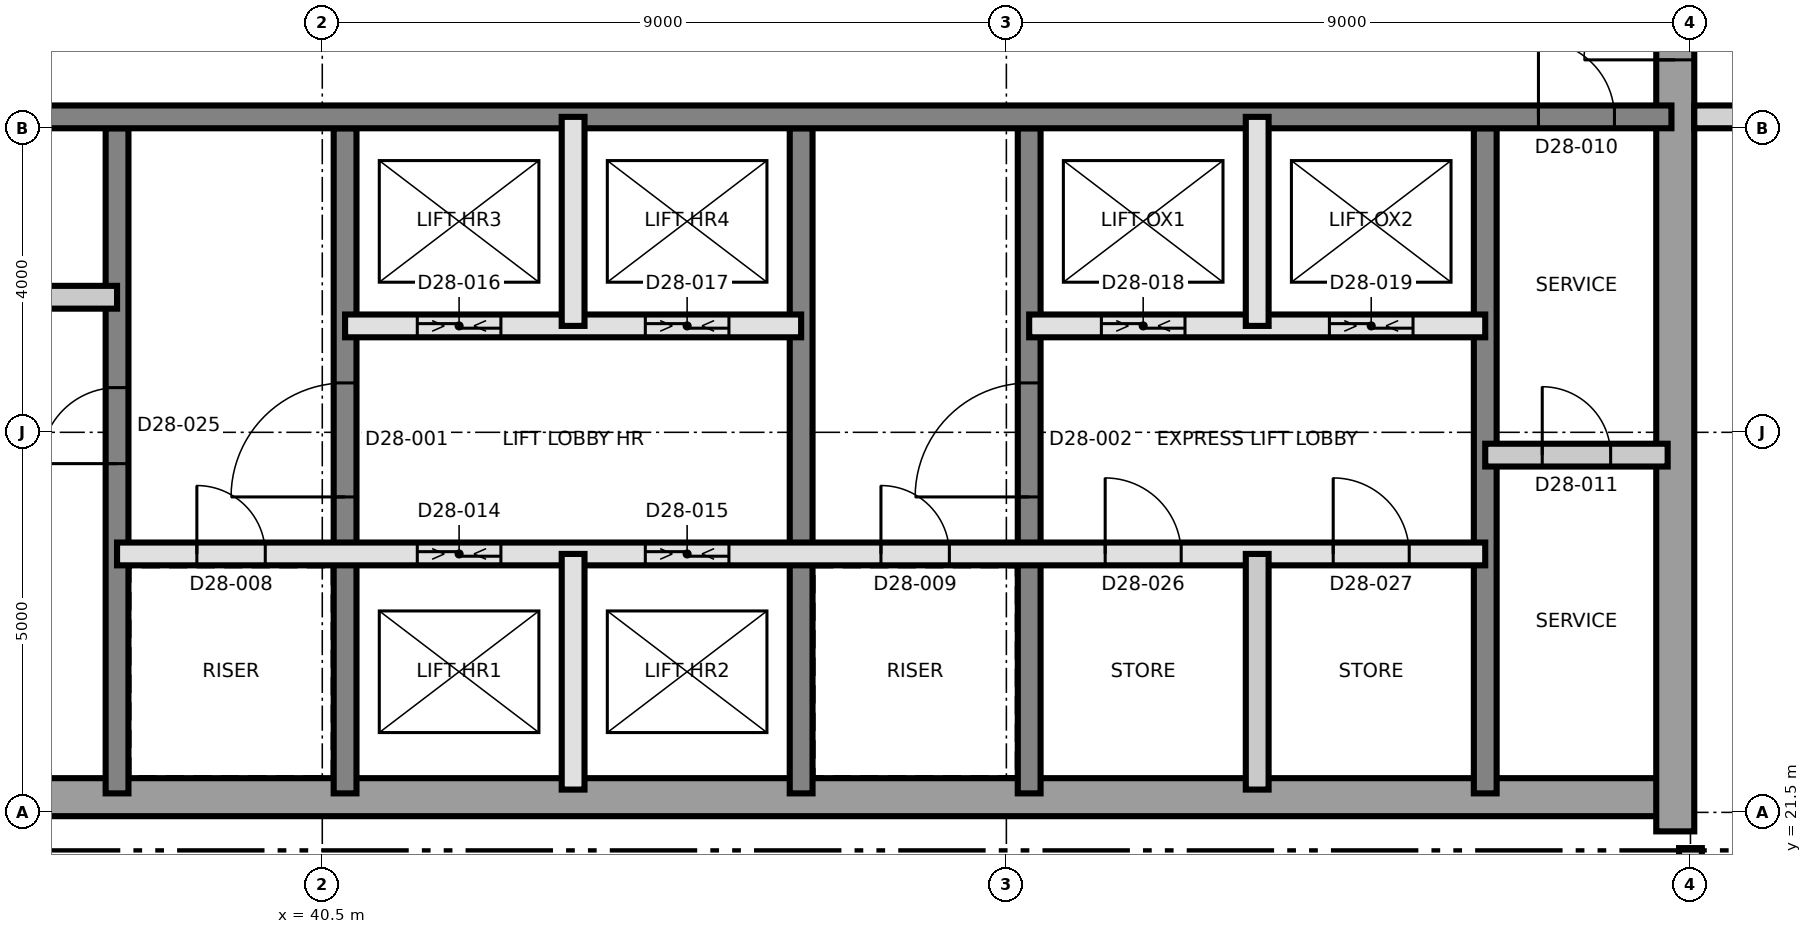
"""IFC4 building model, lengths in metres.
Left out: names, types, materials, properties, quantities, classifications, styles, units other than length and angle.
Written with IfcOpenShell. Run it as: python <this file> out.ifc"""

import sys

from ifc_helpers import new_model, si_unit, direction, frame, frame_2d, origin, place, context, subcontext, project, spatial, rectangle, extrude, element, fill, save


model = new_model("IFC4")
c1 = context("Model", 3, precision=1e-05, world=origin(), true_north=direction((0.0, 1.0)))
c2 = subcontext(c1, "Body", "Model", "MODEL_VIEW")
j1 = project(units=[si_unit("LENGTHUNIT", "METRE"), si_unit("PLANEANGLEUNIT", "RADIAN")], contexts=[c1])
p1 = place(None, origin())
s1 = spatial("IfcSite", under=j1, at=p1, CompositionType="ELEMENT")
p2 = place(p1, origin())
s2 = spatial("IfcBuilding", under=s1, at=p2, CompositionType="ELEMENT")
p3 = place(p2, frame((0.0, 0.0, 249.4)))
s3 = spatial("IfcBuildingStorey", under=s2, at=p3, CompositionType="ELEMENT", Elevation=249.4)
p4 = place(p3, frame((31.25, 21.7, 0.0), z_axis=(0.0, 0.0, 1.0), x_axis=(1.0, 0.0, 0.0)))
e1 = element("IfcWall", 1, at=p4, inside=s3, PredefinedType="SHEAR", context=c2, shape_type="SweptSolid", body=[
    extrude(rectangle(XDim=27.0, YDim=0.5, at=frame_2d((13.5, 0.0))), origin(), (0.0, 0.0, 1.0), 5.5),
])
p5 = place(p3, frame((58.3, 21.25, 0.0), z_axis=(0.0, 0.0, 1.0), x_axis=(0.0, 1.0, 0.0)))
e2 = element("IfcWall", 2, at=p5, inside=s3, PredefinedType="SHEAR", context=c2, shape_type="SweptSolid", body=[
    extrude(rectangle(XDim=18.5, YDim=0.5, at=frame_2d((9.25, 0.0))), origin(), (0.0, 0.0, 1.0), 5.5),
])
p6 = place(p5, frame((10.15, 0.0, 0.0)))
e3 = element("IfcOpeningElement", 3, at=p6, cuts=e2, PredefinedType="OPENING", context=c2, shape_type="SweptSolid", body=[
    extrude(rectangle(XDim=1.2, YDim=2.1, at=frame_2d((0.6, 1.05))), frame((0.0, 0.26, 0.0), z_axis=(0.0, -1.0, 0.0), x_axis=(1.0, 0.0, 0.0)), (0.0, 0.0, 1.0), 0.52),
])
p7 = place(p3, frame((37.8, 21.75, 0.0), z_axis=(0.0, 0.0, 1.0), x_axis=(0.0, 1.0, 0.0)))
e4 = element("IfcWall", 4, at=p7, inside=s3, PredefinedType="SHEAR", context=c2, shape_type="SweptSolid", body=[
    extrude(rectangle(XDim=8.75, YDim=0.3, at=frame_2d((4.375, 0.0))), origin(), (0.0, 0.0, 1.0), 5.5),
])
p8 = place(p7, frame((4.338, 0.0, 0.0)))
e5 = element("IfcOpeningElement", 5, at=p8, cuts=e4, PredefinedType="OPENING", context=c2, shape_type="SweptSolid", body=[
    extrude(rectangle(XDim=1.0, YDim=2.1, at=frame_2d((0.5, 1.05))), frame((0.0, 0.16, 0.0), z_axis=(0.0, -1.0, 0.0), x_axis=(1.0, 0.0, 0.0)), (0.0, 0.0, 1.0), 0.32),
])
p9 = place(p3, frame((40.8, 21.75, 0.0), z_axis=(0.0, 0.0, 1.0), x_axis=(0.0, 1.0, 0.0)))
e6 = element("IfcWall", 6, at=p9, inside=s3, PredefinedType="SHEAR", context=c2, shape_type="SweptSolid", body=[
    extrude(rectangle(XDim=8.75, YDim=0.3, at=frame_2d((4.375, 0.0))), origin(), (0.0, 0.0, 1.0), 5.5),
])
p10 = place(p9, frame((3.9, 0.0, 0.0)))
e7 = element("IfcOpeningElement", 7, at=p10, cuts=e6, PredefinedType="OPENING", context=c2, shape_type="SweptSolid", body=[
    extrude(rectangle(XDim=1.5, YDim=2.1, at=frame_2d((0.75, 1.05))), frame((0.0, 0.16, 0.0), z_axis=(0.0, -1.0, 0.0), x_axis=(1.0, 0.0, 0.0)), (0.0, 0.0, 1.0), 0.32),
])
p11 = place(p3, frame((46.8, 21.75, 0.0), z_axis=(0.0, 0.0, 1.0), x_axis=(0.0, 1.0, 0.0)))
e8 = element("IfcWall", 8, at=p11, inside=s3, PredefinedType="SHEAR", context=c2, shape_type="SweptSolid", body=[
    extrude(rectangle(XDim=8.75, YDim=0.3, at=frame_2d((4.375, 0.0))), origin(), (0.0, 0.0, 1.0), 5.5),
])
p12 = place(p3, frame((49.8, 21.75, 0.0), z_axis=(0.0, 0.0, 1.0), x_axis=(0.0, 1.0, 0.0)))
e9 = element("IfcWall", 9, at=p12, inside=s3, PredefinedType="SHEAR", context=c2, shape_type="SweptSolid", body=[
    extrude(rectangle(XDim=8.75, YDim=0.3, at=frame_2d((4.375, 0.0))), origin(), (0.0, 0.0, 1.0), 5.5),
])
p13 = place(p12, frame((3.9, 0.0, 0.0)))
e10 = element("IfcOpeningElement", 10, at=p13, cuts=e9, PredefinedType="OPENING", context=c2, shape_type="SweptSolid", body=[
    extrude(rectangle(XDim=1.5, YDim=2.1, at=frame_2d((0.75, 1.05))), frame((0.0, 0.16, 0.0), z_axis=(0.0, -1.0, 0.0), x_axis=(1.0, 0.0, 0.0)), (0.0, 0.0, 1.0), 0.32),
])
p14 = place(p3, frame((55.8, 21.75, 0.0), z_axis=(0.0, 0.0, 1.0), x_axis=(0.0, 1.0, 0.0)))
e11 = element("IfcWall", 11, at=p14, inside=s3, PredefinedType="SHEAR", context=c2, shape_type="SweptSolid", body=[
    extrude(rectangle(XDim=8.75, YDim=0.3, at=frame_2d((4.375, 0.0))), origin(), (0.0, 0.0, 1.0), 5.5),
])
p15 = place(p3, frame((31.75, 30.65, 0.0), z_axis=(0.0, 0.0, 1.0), x_axis=(1.0, 0.0, 0.0)))
e12 = element("IfcWall", 12, at=p15, inside=s3, PredefinedType="SHEAR", context=c2, shape_type="SweptSolid", body=[
    extrude(rectangle(XDim=26.5, YDim=0.3, at=frame_2d((13.25, 0.0))), origin(), (0.0, 0.0, 1.0), 5.5),
])
p16 = place(p15, frame((24.75, 0.0, 0.0)))
e13 = element("IfcOpeningElement", 13, at=p16, cuts=e12, PredefinedType="OPENING", context=c2, shape_type="SweptSolid", body=[
    extrude(rectangle(XDim=1.0, YDim=2.1, at=frame_2d((0.5, 1.05))), frame((0.0, 0.16, 0.0), z_axis=(0.0, -1.0, 0.0), x_axis=(1.0, 0.0, 0.0)), (0.0, 0.0, 1.0), 0.32),
])
p17 = place(p15, frame((4.05, 0.0, 0.0)))
e14 = element("IfcOpeningElement", 14, at=p17, cuts=e12, PredefinedType="OPENING", context=c2, shape_type="SweptSolid", body=[
    extrude(rectangle(XDim=1.0, YDim=2.1, at=frame_2d((0.5, 1.05))), frame((0.0, 0.16, 0.0), z_axis=(0.0, -1.0, 0.0), x_axis=(1.0, 0.0, 0.0)), (0.0, 0.0, 1.0), 0.32),
])
p18 = place(p3, frame((37.8, 24.9, 0.0), z_axis=(0.0, 0.0, 1.0), x_axis=(1.0, 0.0, 0.0)))
e15 = element("IfcWall", 15, at=p18, inside=s3, PredefinedType="SOLIDWALL", context=c2, shape_type="SweptSolid", body=[
    extrude(rectangle(XDim=18.0, YDim=0.3, at=frame_2d((9.0, 0.0))), origin(), (0.0, 0.0, 1.0), 5.2),
])
p19 = place(p18, frame((1.05, 0.0, 0.0)))
e16 = element("IfcOpeningElement", 16, at=p19, cuts=e15, PredefinedType="OPENING", context=c2, shape_type="SweptSolid", body=[
    extrude(rectangle(XDim=0.9, YDim=2.1, at=frame_2d((0.45, 1.05))), frame((0.0, 0.16, 0.0), z_axis=(0.0, -1.0, 0.0), x_axis=(1.0, 0.0, 0.0)), (0.0, 0.0, 1.0), 0.32),
])
p20 = place(p18, frame((10.05, 0.0, 0.0)))
e17 = element("IfcOpeningElement", 17, at=p20, cuts=e15, PredefinedType="OPENING", context=c2, shape_type="SweptSolid", body=[
    extrude(rectangle(XDim=0.9, YDim=2.1, at=frame_2d((0.45, 1.05))), frame((0.0, 0.16, 0.0), z_axis=(0.0, -1.0, 0.0), x_axis=(1.0, 0.0, 0.0)), (0.0, 0.0, 1.0), 0.32),
])
p21 = place(p18, frame((3.95, 0.0, 0.0)))
e18 = element("IfcOpeningElement", 18, at=p21, cuts=e15, PredefinedType="OPENING", context=c2, shape_type="SweptSolid", body=[
    extrude(rectangle(XDim=1.1, YDim=2.4, at=frame_2d((0.55, 1.2))), frame((0.0, 0.16, 0.0), z_axis=(0.0, -1.0, 0.0), x_axis=(1.0, 0.0, 0.0)), (0.0, 0.0, 1.0), 0.32),
])
p22 = place(p18, frame((6.95, 0.0, 0.0)))
e19 = element("IfcOpeningElement", 19, at=p22, cuts=e15, PredefinedType="OPENING", context=c2, shape_type="SweptSolid", body=[
    extrude(rectangle(XDim=1.1, YDim=2.4, at=frame_2d((0.55, 1.2))), frame((0.0, 0.16, 0.0), z_axis=(0.0, -1.0, 0.0), x_axis=(1.0, 0.0, 0.0)), (0.0, 0.0, 1.0), 0.32),
])
p23 = place(p18, frame((13.0, 0.0, 0.0)))
e20 = element("IfcOpeningElement", 20, at=p23, cuts=e15, PredefinedType="OPENING", context=c2, shape_type="SweptSolid", body=[
    extrude(rectangle(XDim=1.0, YDim=2.1, at=frame_2d((0.5, 1.05))), frame((0.0, 0.16, 0.0), z_axis=(0.0, -1.0, 0.0), x_axis=(1.0, 0.0, 0.0)), (0.0, 0.0, 1.0), 0.32),
])
p24 = place(p18, frame((16.0, 0.0, 0.0)))
e21 = element("IfcOpeningElement", 21, at=p24, cuts=e15, PredefinedType="OPENING", context=c2, shape_type="SweptSolid", body=[
    extrude(rectangle(XDim=1.0, YDim=2.1, at=frame_2d((0.5, 1.05))), frame((0.0, 0.16, 0.0), z_axis=(0.0, -1.0, 0.0), x_axis=(1.0, 0.0, 0.0)), (0.0, 0.0, 1.0), 0.32),
])
p25 = place(p3, frame((55.8, 26.2, 0.0), z_axis=(0.0, 0.0, 1.0), x_axis=(1.0, 0.0, 0.0)))
e22 = element("IfcWall", 22, at=p25, inside=s3, PredefinedType="PARTITIONING", context=c2, shape_type="SweptSolid", body=[
    extrude(rectangle(XDim=2.4, YDim=0.3, at=frame_2d((1.2, 0.0))), origin(), (0.0, 0.0, 1.0), 5.2),
])
p26 = place(p25, frame((0.75, 0.0, 0.0)))
e23 = element("IfcOpeningElement", 23, at=p26, cuts=e22, PredefinedType="OPENING", context=c2, shape_type="SweptSolid", body=[
    extrude(rectangle(XDim=0.9, YDim=2.1, at=frame_2d((0.45, 1.05))), frame((0.0, 0.16, 0.0), z_axis=(0.0, -1.0, 0.0), x_axis=(1.0, 0.0, 0.0)), (0.0, 0.0, 1.0), 0.32),
])
p27 = place(p3, frame((40.8, 27.9, 0.0), z_axis=(0.0, 0.0, 1.0), x_axis=(1.0, 0.0, 0.0)))
e24 = element("IfcWall", 24, at=p27, inside=s3, PredefinedType="SOLIDWALL", context=c2, shape_type="SweptSolid", body=[
    extrude(rectangle(XDim=6.0, YDim=0.3, at=frame_2d((3.0, 0.0))), origin(), (0.0, 0.0, 1.0), 5.2),
])
p28 = place(p27, frame((0.95, 0.0, 0.0)))
e25 = element("IfcOpeningElement", 25, at=p28, cuts=e24, PredefinedType="OPENING", context=c2, shape_type="SweptSolid", body=[
    extrude(rectangle(XDim=1.1, YDim=2.4, at=frame_2d((0.55, 1.2))), frame((0.0, 0.16, 0.0), z_axis=(0.0, -1.0, 0.0), x_axis=(1.0, 0.0, 0.0)), (0.0, 0.0, 1.0), 0.32),
])
p29 = place(p27, frame((3.95, 0.0, 0.0)))
e26 = element("IfcOpeningElement", 26, at=p29, cuts=e24, PredefinedType="OPENING", context=c2, shape_type="SweptSolid", body=[
    extrude(rectangle(XDim=1.1, YDim=2.4, at=frame_2d((0.55, 1.2))), frame((0.0, 0.16, 0.0), z_axis=(0.0, -1.0, 0.0), x_axis=(1.0, 0.0, 0.0)), (0.0, 0.0, 1.0), 0.32),
])
p30 = place(p3, frame((49.8, 27.9, 0.0), z_axis=(0.0, 0.0, 1.0), x_axis=(1.0, 0.0, 0.0)))
e27 = element("IfcWall", 27, at=p30, inside=s3, PredefinedType="SOLIDWALL", context=c2, shape_type="SweptSolid", body=[
    extrude(rectangle(XDim=6.0, YDim=0.3, at=frame_2d((3.0, 0.0))), origin(), (0.0, 0.0, 1.0), 5.2),
])
p31 = place(p30, frame((0.95, 0.0, 0.0)))
e28 = element("IfcOpeningElement", 28, at=p31, cuts=e27, PredefinedType="OPENING", context=c2, shape_type="SweptSolid", body=[
    extrude(rectangle(XDim=1.1, YDim=2.4, at=frame_2d((0.55, 1.2))), frame((0.0, 0.16, 0.0), z_axis=(0.0, -1.0, 0.0), x_axis=(1.0, 0.0, 0.0)), (0.0, 0.0, 1.0), 0.32),
])
p32 = place(p30, frame((3.95, 0.0, 0.0)))
e29 = element("IfcOpeningElement", 29, at=p32, cuts=e27, PredefinedType="OPENING", context=c2, shape_type="SweptSolid", body=[
    extrude(rectangle(XDim=1.1, YDim=2.4, at=frame_2d((0.55, 1.2))), frame((0.0, 0.16, 0.0), z_axis=(0.0, -1.0, 0.0), x_axis=(1.0, 0.0, 0.0)), (0.0, 0.0, 1.0), 0.32),
])
p33 = place(p3, frame((31.8, 28.277, 0.0), z_axis=(0.0, 0.0, 1.0), x_axis=(1.0, 0.0, 0.0)))
e30 = element("IfcWall", 30, at=p33, inside=s3, PredefinedType="PARTITIONING", context=c2, shape_type="SweptSolid", body=[
    extrude(rectangle(XDim=6.0, YDim=0.3, at=frame_2d((3.0, 0.0))), origin(), (0.0, 0.0, 1.0), 5.2),
])
p34 = place(p3, frame((43.8, 21.8, 0.0), z_axis=(0.0, 0.0, 1.0), x_axis=(0.0, 1.0, 0.0)))
e31 = element("IfcWall", 31, at=p34, inside=s3, PredefinedType="SOLIDWALL", context=c2, shape_type="SweptSolid", body=[
    extrude(rectangle(XDim=3.1, YDim=0.3, at=frame_2d((1.55, 0.0))), origin(), (0.0, 0.0, 1.0), 5.2),
])
p35 = place(p3, frame((43.8, 27.9, 0.0), z_axis=(0.0, 0.0, 1.0), x_axis=(0.0, 1.0, 0.0)))
e32 = element("IfcWall", 32, at=p35, inside=s3, PredefinedType="SOLIDWALL", context=c2, shape_type="SweptSolid", body=[
    extrude(rectangle(XDim=2.75, YDim=0.3, at=frame_2d((1.375, 0.0))), origin(), (0.0, 0.0, 1.0), 5.2),
])
p36 = place(p3, frame((52.8, 21.8, 0.0), z_axis=(0.0, 0.0, 1.0), x_axis=(0.0, 1.0, 0.0)))
e33 = element("IfcWall", 33, at=p36, inside=s3, PredefinedType="PARTITIONING", context=c2, shape_type="SweptSolid", body=[
    extrude(rectangle(XDim=3.1, YDim=0.3, at=frame_2d((1.55, 0.0))), origin(), (0.0, 0.0, 1.0), 5.2),
])
p37 = place(p3, frame((52.8, 27.9, 0.0), z_axis=(0.0, 0.0, 1.0), x_axis=(0.0, 1.0, 0.0)))
e34 = element("IfcWall", 34, at=p37, inside=s3, PredefinedType="SOLIDWALL", context=c2, shape_type="SweptSolid", body=[
    extrude(rectangle(XDim=2.75, YDim=0.3, at=frame_2d((1.375, 0.0))), origin(), (0.0, 0.0, 1.0), 5.2),
])
p38 = place(p3, frame((58.55, 30.65, 0.0), z_axis=(0.0, 0.0, 1.0), x_axis=(1.0, 0.0, 0.0)))
e35 = element("IfcWall", 35, at=p38, inside=s3, PredefinedType="PARTITIONING", context=c2, shape_type="SweptSolid", body=[
    extrude(rectangle(XDim=26.78, YDim=0.3, at=frame_2d((13.39, 0.0))), origin(), (0.0, 0.0, 1.0), 5.2),
])
p39 = place(p38, frame((3.75, 0.0, 0.0)))
e36 = element("IfcOpeningElement", 36, at=p39, cuts=e35, PredefinedType="OPENING", context=c2, shape_type="SweptSolid", body=[
    extrude(rectangle(XDim=1.4, YDim=2.1, at=frame_2d((0.7, 1.05))), frame((0.0, 0.16, 0.0), z_axis=(0.0, -1.0, 0.0), x_axis=(1.0, 0.0, 0.0)), (0.0, 0.0, 1.0), 0.32),
])
p40 = place(p38, frame((12.75, 0.0, 0.0)))
e37 = element("IfcOpeningElement", 37, at=p40, cuts=e35, PredefinedType="OPENING", context=c2, shape_type="SweptSolid", body=[
    extrude(rectangle(XDim=1.4, YDim=2.1, at=frame_2d((0.7, 1.05))), frame((0.0, 0.16, 0.0), z_axis=(0.0, -1.0, 0.0), x_axis=(1.0, 0.0, 0.0)), (0.0, 0.0, 1.0), 0.32),
])
p41 = place(p38, frame((21.85, 0.0, 0.0)))
e38 = element("IfcOpeningElement", 38, at=p41, cuts=e35, PredefinedType="OPENING", context=c2, shape_type="SweptSolid", body=[
    extrude(rectangle(XDim=1.2, YDim=2.1, at=frame_2d((0.6, 1.05))), frame((0.0, 0.16, 0.0), z_axis=(0.0, -1.0, 0.0), x_axis=(1.0, 0.0, 0.0)), (0.0, 0.0, 1.0), 0.32),
])
p42 = place(p3, frame((58.5, 19.77, 0.0), z_axis=(0.0, 0.0, 1.0), x_axis=(0.0, 1.0, 0.0)))
e39 = element("IfcWall", 39, at=p42, inside=s3, PredefinedType="PARTITIONING", context=c2, shape_type="SweptSolid", body=[
    extrude(rectangle(XDim=1.26, YDim=0.3, at=frame_2d((0.63, 0.0))), origin(), (0.0, 0.0, 1.0), 5.2),
])
p43 = place(p10, origin())
e40 = element("IfcDoor", 40, at=p43, inside=s3, OperationType="SINGLE_SWING_RIGHT", PredefinedType="DOOR", context=c2, shape_type="SweptSolid", body=[
    extrude(rectangle(XDim=1.5, YDim=2.1, at=frame_2d((0.75, 1.05))), frame((0.0, 0.025, 0.0), z_axis=(0.0, -1.0, 0.0), x_axis=(1.0, 0.0, 0.0)), (0.0, 0.0, 1.0), 0.05),
])
fill(e7, e40)
p44 = place(p13, origin())
e41 = element("IfcDoor", 41, at=p44, inside=s3, OperationType="SINGLE_SWING_LEFT", PredefinedType="DOOR", context=c2, shape_type="SweptSolid", body=[
    extrude(rectangle(XDim=1.5, YDim=2.1, at=frame_2d((0.75, 1.05))), frame((0.0, 0.025, 0.0), z_axis=(0.0, -1.0, 0.0), x_axis=(1.0, 0.0, 0.0)), (0.0, 0.0, 1.0), 0.05),
])
fill(e10, e41)
p45 = place(p19, origin())
e42 = element("IfcDoor", 42, at=p45, inside=s3, OperationType="SINGLE_SWING_LEFT", PredefinedType="DOOR", context=c2, shape_type="SweptSolid", body=[
    extrude(rectangle(XDim=0.9, YDim=2.1, at=frame_2d((0.45, 1.05))), frame((0.0, 0.025, 0.0), z_axis=(0.0, -1.0, 0.0), x_axis=(1.0, 0.0, 0.0)), (0.0, 0.0, 1.0), 0.05),
])
fill(e16, e42)
p46 = place(p20, origin())
e43 = element("IfcDoor", 43, at=p46, inside=s3, OperationType="SINGLE_SWING_RIGHT", PredefinedType="DOOR", context=c2, shape_type="SweptSolid", body=[
    extrude(rectangle(XDim=0.9, YDim=2.1, at=frame_2d((0.45, 1.05))), frame((0.0, 0.025, 0.0), z_axis=(0.0, -1.0, 0.0), x_axis=(1.0, 0.0, 0.0)), (0.0, 0.0, 1.0), 0.05),
])
fill(e17, e43)
p47 = place(p16, origin())
e44 = element("IfcDoor", 44, at=p47, inside=s3, OperationType="SINGLE_SWING_LEFT", PredefinedType="DOOR", context=c2, shape_type="SweptSolid", body=[
    extrude(rectangle(XDim=1.0, YDim=2.1, at=frame_2d((0.5, 1.05))), frame((0.0, 0.025, 0.0), z_axis=(0.0, -1.0, 0.0), x_axis=(1.0, 0.0, 0.0)), (0.0, 0.0, 1.0), 0.05),
])
fill(e13, e44)
p48 = place(p26, origin())
e45 = element("IfcDoor", 45, at=p48, inside=s3, OperationType="SINGLE_SWING_RIGHT", PredefinedType="DOOR", context=c2, shape_type="SweptSolid", body=[
    extrude(rectangle(XDim=0.9, YDim=2.1, at=frame_2d((0.45, 1.05))), frame((0.0, 0.025, 0.0), z_axis=(0.0, -1.0, 0.0), x_axis=(1.0, 0.0, 0.0)), (0.0, 0.0, 1.0), 0.05),
])
fill(e23, e45)
p49 = place(p6, origin())
e46 = element("IfcDoor", 46, at=p49, inside=s3, OperationType="SINGLE_SWING_LEFT", PredefinedType="DOOR", context=c2, shape_type="SweptSolid", body=[
    extrude(rectangle(XDim=1.2, YDim=2.1, at=frame_2d((0.6, 1.05))), frame((0.0, 0.025, 0.0), z_axis=(0.0, -1.0, 0.0), x_axis=(1.0, 0.0, 0.0)), (0.0, 0.0, 1.0), 0.05),
])
fill(e3, e46)
p50 = place(p21, origin())
e47 = element("IfcDoor", 47, at=p50, inside=s3, OperationType="SLIDING_TO_LEFT", PredefinedType="DOOR", context=c2, shape_type="SweptSolid", body=[
    extrude(rectangle(XDim=1.1, YDim=2.4, at=frame_2d((0.55, 1.2))), frame((0.0, 0.025, 0.0), z_axis=(0.0, -1.0, 0.0), x_axis=(1.0, 0.0, 0.0)), (0.0, 0.0, 1.0), 0.05),
])
fill(e18, e47)
p51 = place(p22, origin())
e48 = element("IfcDoor", 48, at=p51, inside=s3, OperationType="SLIDING_TO_LEFT", PredefinedType="DOOR", context=c2, shape_type="SweptSolid", body=[
    extrude(rectangle(XDim=1.1, YDim=2.4, at=frame_2d((0.55, 1.2))), frame((0.0, 0.025, 0.0), z_axis=(0.0, -1.0, 0.0), x_axis=(1.0, 0.0, 0.0)), (0.0, 0.0, 1.0), 0.05),
])
fill(e19, e48)
p52 = place(p28, origin())
e49 = element("IfcDoor", 49, at=p52, inside=s3, OperationType="SLIDING_TO_LEFT", PredefinedType="DOOR", context=c2, shape_type="SweptSolid", body=[
    extrude(rectangle(XDim=1.1, YDim=2.4, at=frame_2d((0.55, 1.2))), frame((0.0, 0.025, 0.0), z_axis=(0.0, -1.0, 0.0), x_axis=(1.0, 0.0, 0.0)), (0.0, 0.0, 1.0), 0.05),
])
fill(e25, e49)
p53 = place(p29, origin())
e50 = element("IfcDoor", 50, at=p53, inside=s3, OperationType="SLIDING_TO_LEFT", PredefinedType="DOOR", context=c2, shape_type="SweptSolid", body=[
    extrude(rectangle(XDim=1.1, YDim=2.4, at=frame_2d((0.55, 1.2))), frame((0.0, 0.025, 0.0), z_axis=(0.0, -1.0, 0.0), x_axis=(1.0, 0.0, 0.0)), (0.0, 0.0, 1.0), 0.05),
])
fill(e26, e50)
p54 = place(p31, origin())
e51 = element("IfcDoor", 51, at=p54, inside=s3, OperationType="SLIDING_TO_LEFT", PredefinedType="DOOR", context=c2, shape_type="SweptSolid", body=[
    extrude(rectangle(XDim=1.1, YDim=2.4, at=frame_2d((0.55, 1.2))), frame((0.0, 0.025, 0.0), z_axis=(0.0, -1.0, 0.0), x_axis=(1.0, 0.0, 0.0)), (0.0, 0.0, 1.0), 0.05),
])
fill(e28, e51)
p55 = place(p32, origin())
e52 = element("IfcDoor", 52, at=p55, inside=s3, OperationType="SLIDING_TO_LEFT", PredefinedType="DOOR", context=c2, shape_type="SweptSolid", body=[
    extrude(rectangle(XDim=1.1, YDim=2.4, at=frame_2d((0.55, 1.2))), frame((0.0, 0.025, 0.0), z_axis=(0.0, -1.0, 0.0), x_axis=(1.0, 0.0, 0.0)), (0.0, 0.0, 1.0), 0.05),
])
fill(e29, e52)
p56 = place(p8, origin())
e53 = element("IfcDoor", 53, at=p56, inside=s3, OperationType="SINGLE_SWING_RIGHT", PredefinedType="DOOR", context=c2, shape_type="SweptSolid", body=[
    extrude(rectangle(XDim=1.0, YDim=2.1, at=frame_2d((0.5, 1.05))), frame((0.0, 0.025, 0.0), z_axis=(0.0, -1.0, 0.0), x_axis=(1.0, 0.0, 0.0)), (0.0, 0.0, 1.0), 0.05),
])
fill(e5, e53)
p57 = place(p23, origin())
e54 = element("IfcDoor", 54, at=p57, inside=s3, OperationType="SINGLE_SWING_LEFT", PredefinedType="DOOR", context=c2, shape_type="SweptSolid", body=[
    extrude(rectangle(XDim=1.0, YDim=2.1, at=frame_2d((0.5, 1.05))), frame((0.0, 0.025, 0.0), z_axis=(0.0, -1.0, 0.0), x_axis=(1.0, 0.0, 0.0)), (0.0, 0.0, 1.0), 0.05),
])
fill(e20, e54)
p58 = place(p24, origin())
e55 = element("IfcDoor", 55, at=p58, inside=s3, OperationType="SINGLE_SWING_RIGHT", PredefinedType="DOOR", context=c2, shape_type="SweptSolid", body=[
    extrude(rectangle(XDim=1.0, YDim=2.1, at=frame_2d((0.5, 1.05))), frame((0.0, 0.025, 0.0), z_axis=(0.0, -1.0, 0.0), x_axis=(1.0, 0.0, 0.0)), (0.0, 0.0, 1.0), 0.05),
])
fill(e21, e55)
save(model, sys.argv[1])
